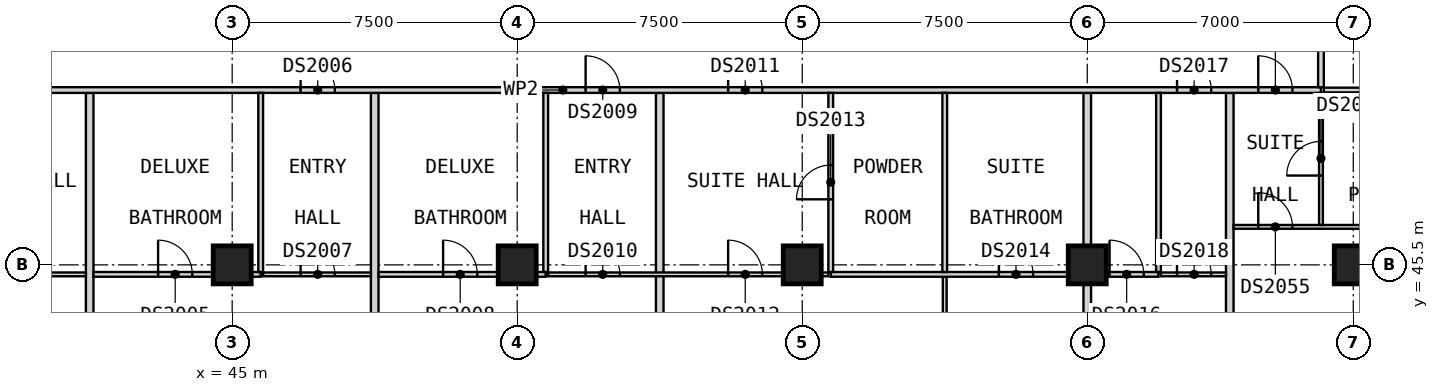
"""IFC4 building model, lengths in metres.
Left out: names, types, materials, properties, quantities, classifications, styles, units other than length and angle.
Written with IfcOpenShell. Run it as: python <this file> out.ifc"""

import sys

from ifc_helpers import new_model, si_unit, direction, frame, frame_2d, origin, origin_2d, place, context, subcontext, project, spatial, rectangle, extrude, element, fill, save


model = new_model("IFC4")
c1 = context("Model", 3, precision=1e-05, world=origin(), true_north=direction((0.0, 1.0)))
c2 = subcontext(c1, "Body", "Model", "MODEL_VIEW")
j1 = project(units=[si_unit("LENGTHUNIT", "METRE"), si_unit("PLANEANGLEUNIT", "RADIAN")], contexts=[c1])
p1 = place(None, origin())
s1 = spatial("IfcSite", under=j1, at=p1, CompositionType="ELEMENT")
p2 = place(p1, origin())
s2 = spatial("IfcBuilding", under=s1, at=p2, CompositionType="ELEMENT")
p3 = place(p2, frame((0.0, 0.0, 162.6)))
s3 = spatial("IfcBuildingStorey", under=s2, at=p3, CompositionType="ELEMENT", Elevation=162.6)
for number, where, z_axis, x_axis in (
    (1, (45.0, 45.5, 0.0), (0.0, 0.0, 1.0), (1.0, 0.0, 0.0)),
    (2, (52.5, 45.5, 0.0), (0.0, 0.0, 1.0), (1.0, 0.0, 0.0)),
    (3, (60.0, 45.5, 0.0), (0.0, 0.0, 1.0), (1.0, 0.0, 0.0)),
    (4, (67.5, 45.5, 0.0), (0.0, 0.0, 1.0), (1.0, 0.0, 0.0)),
    (5, (74.5, 45.5, 0.0), (0.0, 0.0, 1.0), (1.0, 0.0, 0.0)),
):
    element("IfcColumn", number, at=place(p3, frame(where, z_axis=z_axis, x_axis=x_axis)), inside=s3, PredefinedType="COLUMN", context=c2, shape_type="SweptSolid", body=[
        extrude(rectangle(XDim=1.0, YDim=1.0, at=origin_2d()), origin(), (0.0, 0.0, 1.0), 3.6),
    ])
for number, where, z_axis, x_axis in (
    (6, (41.25, 38.31, 0.0), (0.0, 0.0, 1.0), (0.0, 1.0, 0.0)),
    (7, (48.75, 38.31, 0.0), (0.0, 0.0, 1.0), (0.0, 1.0, 0.0)),
    (8, (56.25, 38.31, 0.0), (0.0, 0.0, 1.0), (0.0, 1.0, 0.0)),
):
    element("IfcWall", number, at=place(p3, frame(where, z_axis=z_axis, x_axis=x_axis)), inside=s3, PredefinedType="PARTITIONING", context=c2, shape_type="SweptSolid", body=[
        extrude(rectangle(XDim=11.715, YDim=0.2, at=frame_2d((5.857, 0.0))), origin(), (0.0, 0.0, 1.0), 3.2),
    ])
p4 = place(p3, frame((67.5, 37.5, 0.0), z_axis=(0.0, 0.0, 1.0), x_axis=(0.0, 1.0, 0.0)))
e9 = element("IfcWall", 9, at=p4, inside=s3, PredefinedType="PARTITIONING", context=c2, shape_type="SweptSolid", body=[
    extrude(rectangle(XDim=12.525, YDim=0.2, at=frame_2d((6.262, 0.0))), origin(), (0.0, 0.0, 1.0), 3.2),
])
p5 = place(p3, frame((71.25, 38.31, 0.0), z_axis=(0.0, 0.0, 1.0), x_axis=(0.0, 1.0, 0.0)))
e10 = element("IfcWall", 10, at=p5, inside=s3, PredefinedType="PARTITIONING", context=c2, shape_type="SweptSolid", body=[
    extrude(rectangle(XDim=11.715, YDim=0.2, at=frame_2d((5.857, 0.0))), origin(), (0.0, 0.0, 1.0), 3.2),
])
p6 = place(p3, frame((33.75, 50.1, 0.0), z_axis=(0.0, 0.0, 1.0), x_axis=(1.0, 0.0, 0.0)))
e11 = element("IfcWall", 11, at=p6, inside=s3, PredefinedType="PARTITIONING", context=c2, shape_type="SweptSolid", body=[
    extrude(rectangle(XDim=39.9, YDim=0.15, at=frame_2d((19.95, 0.0))), origin(), (0.0, 0.0, 1.0), 3.2),
])
p7 = place(p6, frame((5.175, 0.0, 0.0)))
e12 = element("IfcOpeningElement", 12, at=p7, cuts=e11, PredefinedType="OPENING", context=c2, shape_type="SweptSolid", body=[
    extrude(rectangle(XDim=0.9, YDim=2.1, at=frame_2d((0.45, 1.05))), frame((0.0, 0.085, 0.0), z_axis=(0.0, -1.0, 0.0), x_axis=(1.0, 0.0, 0.0)), (0.0, 0.0, 1.0), 0.17),
])
p8 = place(p6, frame((13.05, 0.0, 0.0)))
e13 = element("IfcOpeningElement", 13, at=p8, cuts=e11, PredefinedType="OPENING", context=c2, shape_type="SweptSolid", body=[
    extrude(rectangle(XDim=0.9, YDim=2.1, at=frame_2d((0.45, 1.05))), frame((0.0, 0.085, 0.0), z_axis=(0.0, -1.0, 0.0), x_axis=(1.0, 0.0, 0.0)), (0.0, 0.0, 1.0), 0.17),
])
p9 = place(p6, frame((20.55, 0.0, 0.0)))
e14 = element("IfcOpeningElement", 14, at=p9, cuts=e11, PredefinedType="OPENING", context=c2, shape_type="SweptSolid", body=[
    extrude(rectangle(XDim=0.9, YDim=2.1, at=frame_2d((0.45, 1.05))), frame((0.0, 0.085, 0.0), z_axis=(0.0, -1.0, 0.0), x_axis=(1.0, 0.0, 0.0)), (0.0, 0.0, 1.0), 0.17),
])
p10 = place(p6, frame((24.3, 0.0, 0.0)))
e15 = element("IfcOpeningElement", 15, at=p10, cuts=e11, PredefinedType="OPENING", context=c2, shape_type="SweptSolid", body=[
    extrude(rectangle(XDim=0.9, YDim=2.1, at=frame_2d((0.45, 1.05))), frame((0.0, 0.085, 0.0), z_axis=(0.0, -1.0, 0.0), x_axis=(1.0, 0.0, 0.0)), (0.0, 0.0, 1.0), 0.17),
])
p11 = place(p6, frame((36.113, 0.0, 0.0)))
e16 = element("IfcOpeningElement", 16, at=p11, cuts=e11, PredefinedType="OPENING", context=c2, shape_type="SweptSolid", body=[
    extrude(rectangle(XDim=0.9, YDim=2.1, at=frame_2d((0.45, 1.05))), frame((0.0, 0.085, 0.0), z_axis=(0.0, -1.0, 0.0), x_axis=(1.0, 0.0, 0.0)), (0.0, 0.0, 1.0), 0.17),
])
p12 = place(p6, frame((38.25, 0.0, 0.0)))
e17 = element("IfcOpeningElement", 17, at=p12, cuts=e11, PredefinedType="OPENING", context=c2, shape_type="SweptSolid", body=[
    extrude(rectangle(XDim=0.9, YDim=2.1, at=frame_2d((0.45, 1.05))), frame((0.0, 0.085, 0.0), z_axis=(0.0, -1.0, 0.0), x_axis=(1.0, 0.0, 0.0)), (0.0, 0.0, 1.0), 0.17),
])
p13 = place(p3, frame((73.65, 50.175, 0.0), z_axis=(0.0, 0.0, 1.0), x_axis=(0.0, 1.0, 0.0)))
e18 = element("IfcWall", 18, at=p13, inside=s3, PredefinedType="PARTITIONING", context=c2, shape_type="SweptSolid", body=[
    extrude(rectangle(XDim=38.4, YDim=0.15, at=frame_2d((19.2, 0.0))), origin(), (0.0, 0.0, 1.0), 3.2),
])
p14 = place(p13, frame((7.875, 0.0, 0.0)))
e19 = element("IfcOpeningElement", 19, at=p14, cuts=e18, PredefinedType="OPENING", context=c2, shape_type="SweptSolid", body=[
    extrude(rectangle(XDim=0.9, YDim=2.1, at=frame_2d((0.45, 1.05))), frame((0.0, 0.085, 0.0), z_axis=(0.0, -1.0, 0.0), x_axis=(1.0, 0.0, 0.0)), (0.0, 0.0, 1.0), 0.17),
])
p15 = place(p13, frame((12.188, 0.0, 0.0)))
e20 = element("IfcOpeningElement", 20, at=p15, cuts=e18, PredefinedType="OPENING", context=c2, shape_type="SweptSolid", body=[
    extrude(rectangle(XDim=0.9, YDim=2.1, at=frame_2d((0.45, 1.05))), frame((0.0, 0.085, 0.0), z_axis=(0.0, -1.0, 0.0), x_axis=(1.0, 0.0, 0.0)), (0.0, 0.0, 1.0), 0.17),
])
p16 = place(p13, frame((15.375, 0.0, 0.0)))
e21 = element("IfcOpeningElement", 21, at=p16, cuts=e18, PredefinedType="OPENING", context=c2, shape_type="SweptSolid", body=[
    extrude(rectangle(XDim=0.9, YDim=2.1, at=frame_2d((0.45, 1.05))), frame((0.0, 0.085, 0.0), z_axis=(0.0, -1.0, 0.0), x_axis=(1.0, 0.0, 0.0)), (0.0, 0.0, 1.0), 0.17),
])
p17 = place(p13, frame((30.375, 0.0, 0.0)))
e22 = element("IfcOpeningElement", 22, at=p17, cuts=e18, PredefinedType="OPENING", context=c2, shape_type="SweptSolid", body=[
    extrude(rectangle(XDim=0.9, YDim=2.1, at=frame_2d((0.45, 1.05))), frame((0.0, 0.085, 0.0), z_axis=(0.0, -1.0, 0.0), x_axis=(1.0, 0.0, 0.0)), (0.0, 0.0, 1.0), 0.17),
])
p18 = place(p13, frame((34.688, 0.0, 0.0)))
e23 = element("IfcOpeningElement", 23, at=p18, cuts=e18, PredefinedType="OPENING", context=c2, shape_type="SweptSolid", body=[
    extrude(rectangle(XDim=0.9, YDim=2.1, at=frame_2d((0.45, 1.05))), frame((0.0, 0.085, 0.0), z_axis=(0.0, -1.0, 0.0), x_axis=(1.0, 0.0, 0.0)), (0.0, 0.0, 1.0), 0.17),
])
p19 = place(p3, frame((33.812, 45.25, 0.0), z_axis=(0.0, 0.0, 1.0), x_axis=(1.0, 0.0, 0.0)))
e24 = element("IfcWall", 24, at=p19, inside=s3, PredefinedType="PARTITIONING", context=c2, shape_type="SweptSolid", body=[
    extrude(rectangle(XDim=7.337, YDim=0.1, at=frame_2d((3.669, 0.0))), origin(), (0.0, 0.0, 1.0), 3.2),
])
p20 = place(p19, frame((5.113, 0.0, 0.0)))
e25 = element("IfcOpeningElement", 25, at=p20, cuts=e24, PredefinedType="OPENING", context=c2, shape_type="SweptSolid", body=[
    extrude(rectangle(XDim=0.9, YDim=2.1, at=frame_2d((0.45, 1.05))), frame((0.0, 0.06, 0.0), z_axis=(0.0, -1.0, 0.0), x_axis=(1.0, 0.0, 0.0)), (0.0, 0.0, 1.0), 0.12),
])
p21 = place(p3, frame((45.812, 45.25, 0.0), z_axis=(0.0, 0.0, 1.0), x_axis=(1.0, 0.0, 0.0)))
e26 = element("IfcWall", 26, at=p21, inside=s3, PredefinedType="PARTITIONING", context=c2, shape_type="SweptSolid", body=[
    extrude(rectangle(XDim=2.837, YDim=0.1, at=frame_2d((1.419, 0.0))), origin(), (0.0, 0.0, 1.0), 3.2),
])
p22 = place(p21, frame((0.988, 0.0, 0.0)))
e27 = element("IfcOpeningElement", 27, at=p22, cuts=e26, PredefinedType="OPENING", context=c2, shape_type="SweptSolid", body=[
    extrude(rectangle(XDim=0.9, YDim=2.1, at=frame_2d((0.45, 1.05))), frame((0.0, 0.06, 0.0), z_axis=(0.0, -1.0, 0.0), x_axis=(1.0, 0.0, 0.0)), (0.0, 0.0, 1.0), 0.12),
])
p23 = place(p3, frame((53.312, 45.25, 0.0), z_axis=(0.0, 0.0, 1.0), x_axis=(1.0, 0.0, 0.0)))
e28 = element("IfcWall", 28, at=p23, inside=s3, PredefinedType="PARTITIONING", context=c2, shape_type="SweptSolid", body=[
    extrude(rectangle(XDim=7.375, YDim=0.1, at=frame_2d((3.688, 0.0))), origin(), (0.0, 0.0, 1.0), 3.2),
])
p24 = place(p23, frame((0.988, 0.0, 0.0)))
e29 = element("IfcOpeningElement", 29, at=p24, cuts=e28, PredefinedType="OPENING", context=c2, shape_type="SweptSolid", body=[
    extrude(rectangle(XDim=0.9, YDim=2.1, at=frame_2d((0.45, 1.05))), frame((0.0, 0.06, 0.0), z_axis=(0.0, -1.0, 0.0), x_axis=(1.0, 0.0, 0.0)), (0.0, 0.0, 1.0), 0.12),
])
p25 = place(p23, frame((4.738, 0.0, 0.0)))
e30 = element("IfcOpeningElement", 30, at=p25, cuts=e28, PredefinedType="OPENING", context=c2, shape_type="SweptSolid", body=[
    extrude(rectangle(XDim=0.9, YDim=2.1, at=frame_2d((0.45, 1.05))), frame((0.0, 0.06, 0.0), z_axis=(0.0, -1.0, 0.0), x_axis=(1.0, 0.0, 0.0)), (0.0, 0.0, 1.0), 0.12),
])
p26 = place(p3, frame((69.438, 45.25, 0.0), z_axis=(0.0, 0.0, 1.0), x_axis=(1.0, 0.0, 0.0)))
e31 = element("IfcWall", 31, at=p26, inside=s3, PredefinedType="PARTITIONING", context=c2, shape_type="SweptSolid", body=[
    extrude(rectangle(XDim=1.712, YDim=0.1, at=frame_2d((0.856, 0.0))), origin(), (0.0, 0.0, 1.0), 3.2),
])
p27 = place(p26, frame((0.425, 0.0, 0.0)))
e32 = element("IfcOpeningElement", 32, at=p27, cuts=e31, PredefinedType="OPENING", context=c2, shape_type="SweptSolid", body=[
    extrude(rectangle(XDim=0.9, YDim=2.1, at=frame_2d((0.45, 1.05))), frame((0.0, 0.06, 0.0), z_axis=(0.0, -1.0, 0.0), x_axis=(1.0, 0.0, 0.0)), (0.0, 0.0, 1.0), 0.12),
])
p28 = place(p3, frame((71.35, 46.5, 0.0), z_axis=(0.0, 0.0, 1.0), x_axis=(1.0, 0.0, 0.0)))
e33 = element("IfcWall", 33, at=p28, inside=s3, PredefinedType="PARTITIONING", context=c2, shape_type="SweptSolid", body=[
    extrude(rectangle(XDim=7.35, YDim=0.1, at=frame_2d((3.675, 0.0))), origin(), (0.0, 0.0, 1.0), 3.2),
])
p29 = place(p28, frame((0.65, 0.0, 0.0)))
e34 = element("IfcOpeningElement", 34, at=p29, cuts=e33, PredefinedType="OPENING", context=c2, shape_type="SweptSolid", body=[
    extrude(rectangle(XDim=0.9, YDim=2.1, at=frame_2d((0.45, 1.05))), frame((0.0, 0.06, 0.0), z_axis=(0.0, -1.0, 0.0), x_axis=(1.0, 0.0, 0.0)), (0.0, 0.0, 1.0), 0.12),
])
p30 = place(p3, frame((63.75, 38.31, 0.0), z_axis=(0.0, 0.0, 1.0), x_axis=(0.0, 1.0, 0.0)))
e35 = element("IfcWall", 35, at=p30, inside=s3, PredefinedType="PARTITIONING", context=c2, shape_type="SweptSolid", body=[
    extrude(rectangle(XDim=6.877, YDim=0.1, at=frame_2d((3.439, 0.0))), origin(), (0.0, 0.0, 1.0), 3.2),
])
p31 = place(p30, frame((2.615, 0.0, 0.0)))
e36 = element("IfcOpeningElement", 36, at=p31, cuts=e35, PredefinedType="OPENING", context=c2, shape_type="SweptSolid", body=[
    extrude(rectangle(XDim=0.9, YDim=2.1, at=frame_2d((0.45, 1.05))), frame((0.0, 0.06, 0.0), z_axis=(0.0, -1.0, 0.0), x_axis=(1.0, 0.0, 0.0)), (0.0, 0.0, 1.0), 0.12),
])
p32 = place(p3, frame((73.65, 46.55, 0.0), z_axis=(0.0, 0.0, 1.0), x_axis=(0.0, 1.0, 0.0)))
e37 = element("IfcWall", 37, at=p32, inside=s3, PredefinedType="PARTITIONING", context=c2, shape_type="SweptSolid", body=[
    extrude(rectangle(XDim=3.475, YDim=0.1, at=frame_2d((1.737, 0.0))), origin(), (0.0, 0.0, 1.0), 3.2),
])
p33 = place(p32, frame((1.3, 0.0, 0.0)))
e38 = element("IfcOpeningElement", 38, at=p33, cuts=e37, PredefinedType="OPENING", context=c2, shape_type="SweptSolid", body=[
    extrude(rectangle(XDim=0.9, YDim=2.1, at=frame_2d((0.45, 1.05))), frame((0.0, 0.06, 0.0), z_axis=(0.0, -1.0, 0.0), x_axis=(1.0, 0.0, 0.0)), (0.0, 0.0, 1.0), 0.12),
])
p34 = place(p3, frame((41.35, 45.25, 0.0), z_axis=(0.0, 0.0, 1.0), x_axis=(1.0, 0.0, 0.0)))
e39 = element("IfcWall", 39, at=p34, inside=s3, PredefinedType="PARTITIONING", context=c2, shape_type="SweptSolid", body=[
    extrude(rectangle(XDim=4.4, YDim=0.125, at=frame_2d((2.2, 0.0))), origin(), (0.0, 0.0, 1.0), 3.2),
])
p35 = place(p34, frame((1.7, 0.0, 0.0)))
e40 = element("IfcOpeningElement", 40, at=p35, cuts=e39, PredefinedType="OPENING", context=c2, shape_type="SweptSolid", body=[
    extrude(rectangle(XDim=0.9, YDim=2.1, at=frame_2d((0.45, 1.05))), frame((0.0, 0.073, 0.0), z_axis=(0.0, -1.0, 0.0), x_axis=(1.0, 0.0, 0.0)), (0.0, 0.0, 1.0), 0.145),
])
p36 = place(p3, frame((48.85, 45.25, 0.0), z_axis=(0.0, 0.0, 1.0), x_axis=(1.0, 0.0, 0.0)))
e41 = element("IfcWall", 41, at=p36, inside=s3, PredefinedType="PARTITIONING", context=c2, shape_type="SweptSolid", body=[
    extrude(rectangle(XDim=4.4, YDim=0.125, at=frame_2d((2.2, 0.0))), origin(), (0.0, 0.0, 1.0), 3.2),
])
p37 = place(p36, frame((1.7, 0.0, 0.0)))
e42 = element("IfcOpeningElement", 42, at=p37, cuts=e41, PredefinedType="OPENING", context=c2, shape_type="SweptSolid", body=[
    extrude(rectangle(XDim=0.9, YDim=2.1, at=frame_2d((0.45, 1.05))), frame((0.0, 0.073, 0.0), z_axis=(0.0, -1.0, 0.0), x_axis=(1.0, 0.0, 0.0)), (0.0, 0.0, 1.0), 0.145),
])
p38 = place(p3, frame((60.75, 45.25, 0.0), z_axis=(0.0, 0.0, 1.0), x_axis=(1.0, 0.0, 0.0)))
e43 = element("IfcWall", 43, at=p38, inside=s3, PredefinedType="PARTITIONING", context=c2, shape_type="SweptSolid", body=[
    extrude(rectangle(XDim=8.625, YDim=0.125, at=frame_2d((4.312, 0.0))), origin(), (0.0, 0.0, 1.0), 3.2),
])
p39 = place(p38, frame((4.425, 0.0, 0.0)))
e44 = element("IfcOpeningElement", 44, at=p39, cuts=e43, PredefinedType="OPENING", context=c2, shape_type="SweptSolid", body=[
    extrude(rectangle(XDim=0.9, YDim=2.1, at=frame_2d((0.45, 1.05))), frame((0.0, 0.073, 0.0), z_axis=(0.0, -1.0, 0.0), x_axis=(1.0, 0.0, 0.0)), (0.0, 0.0, 1.0), 0.145),
])
p40 = place(p38, frame((7.337, 0.0, 0.0)))
e45 = element("IfcOpeningElement", 45, at=p40, cuts=e43, PredefinedType="OPENING", context=c2, shape_type="SweptSolid", body=[
    extrude(rectangle(XDim=0.9, YDim=2.1, at=frame_2d((0.45, 1.05))), frame((0.0, 0.073, 0.0), z_axis=(0.0, -1.0, 0.0), x_axis=(1.0, 0.0, 0.0)), (0.0, 0.0, 1.0), 0.145),
])
p41 = place(p3, frame((73.725, 50.1, 0.0), z_axis=(0.0, 0.0, 1.0), x_axis=(1.0, 0.0, 0.0)))
e46 = element("IfcWall", 46, at=p41, inside=s3, PredefinedType="PARTITIONING", context=c2, shape_type="SweptSolid", body=[
    extrude(rectangle(XDim=5.025, YDim=0.125, at=frame_2d((2.512, 0.0))), origin(), (0.0, 0.0, 1.0), 3.2),
])
for number, where, z_axis, x_axis in (
    (47, (45.75, 45.312, 0.0), (0.0, 0.0, 1.0), (0.0, 1.0, 0.0)),
    (48, (53.25, 45.312, 0.0), (0.0, 0.0, 1.0), (0.0, 1.0, 0.0)),
):
    element("IfcWall", number, at=place(p3, frame(where, z_axis=z_axis, x_axis=x_axis)), inside=s3, PredefinedType="PARTITIONING", context=c2, shape_type="SweptSolid", body=[
        extrude(rectangle(XDim=4.712, YDim=0.125, at=frame_2d((2.356, 0.0))), origin(), (0.0, 0.0, 1.0), 3.2),
    ])
p42 = place(p3, frame((60.75, 45.312, 0.0), z_axis=(0.0, 0.0, 1.0), x_axis=(0.0, 1.0, 0.0)))
e49 = element("IfcWall", 49, at=p42, inside=s3, PredefinedType="PARTITIONING", context=c2, shape_type="SweptSolid", body=[
    extrude(rectangle(XDim=4.712, YDim=0.125, at=frame_2d((2.356, 0.0))), origin(), (0.0, 0.0, 1.0), 3.2),
])
p43 = place(p42, frame((1.913, 0.0, 0.0)))
e50 = element("IfcOpeningElement", 50, at=p43, cuts=e49, PredefinedType="OPENING", context=c2, shape_type="SweptSolid", body=[
    extrude(rectangle(XDim=0.9, YDim=2.1, at=frame_2d((0.45, 1.05))), frame((0.0, 0.073, 0.0), z_axis=(0.0, -1.0, 0.0), x_axis=(1.0, 0.0, 0.0)), (0.0, 0.0, 1.0), 0.145),
])
for number, where, z_axis, x_axis in (
    (51, (63.75, 45.312, 0.0), (0.0, 0.0, 1.0), (0.0, 1.0, 0.0)),
    (52, (69.375, 45.312, 0.0), (0.0, 0.0, 1.0), (0.0, 1.0, 0.0)),
):
    element("IfcWall", number, at=place(p3, frame(where, z_axis=z_axis, x_axis=x_axis)), inside=s3, PredefinedType="PARTITIONING", context=c2, shape_type="SweptSolid", body=[
        extrude(rectangle(XDim=4.712, YDim=0.125, at=frame_2d((2.356, 0.0))), origin(), (0.0, 0.0, 1.0), 3.2),
    ])
p44 = place(p35, origin())
e53 = element("IfcDoor", 53, at=p44, inside=s3, OperationType="SINGLE_SWING_LEFT", PredefinedType="DOOR", context=c2, shape_type="SweptSolid", body=[
    extrude(rectangle(XDim=0.9, YDim=2.1, at=frame_2d((0.45, 1.05))), frame((0.0, 0.025, 0.0), z_axis=(0.0, -1.0, 0.0), x_axis=(1.0, 0.0, 0.0)), (0.0, 0.0, 1.0), 0.05),
])
fill(e40, e53)
p45 = place(p8, origin())
e54 = element("IfcDoor", 54, at=p45, inside=s3, OperationType="SINGLE_SWING_RIGHT", PredefinedType="DOOR", context=c2, shape_type="SweptSolid", body=[
    extrude(rectangle(XDim=0.9, YDim=2.1, at=frame_2d((0.45, 1.05))), frame((0.0, 0.025, 0.0), z_axis=(0.0, -1.0, 0.0), x_axis=(1.0, 0.0, 0.0)), (0.0, 0.0, 1.0), 0.05),
])
fill(e13, e54)
p46 = place(p22, origin())
e55 = element("IfcDoor", 55, at=p46, inside=s3, OperationType="SINGLE_SWING_LEFT", PredefinedType="DOOR", context=c2, shape_type="SweptSolid", body=[
    extrude(rectangle(XDim=0.9, YDim=2.1, at=frame_2d((0.45, 1.05))), frame((0.0, 0.025, 0.0), z_axis=(0.0, -1.0, 0.0), x_axis=(1.0, 0.0, 0.0)), (0.0, 0.0, 1.0), 0.05),
])
fill(e27, e55)
p47 = place(p37, origin())
e56 = element("IfcDoor", 56, at=p47, inside=s3, OperationType="SINGLE_SWING_LEFT", PredefinedType="DOOR", context=c2, shape_type="SweptSolid", body=[
    extrude(rectangle(XDim=0.9, YDim=2.1, at=frame_2d((0.45, 1.05))), frame((0.0, 0.025, 0.0), z_axis=(0.0, -1.0, 0.0), x_axis=(1.0, 0.0, 0.0)), (0.0, 0.0, 1.0), 0.05),
])
fill(e42, e56)
p48 = place(p9, origin())
e57 = element("IfcDoor", 57, at=p48, inside=s3, OperationType="SINGLE_SWING_RIGHT", PredefinedType="DOOR", context=c2, shape_type="SweptSolid", body=[
    extrude(rectangle(XDim=0.9, YDim=2.1, at=frame_2d((0.45, 1.05))), frame((0.0, 0.025, 0.0), z_axis=(0.0, -1.0, 0.0), x_axis=(1.0, 0.0, 0.0)), (0.0, 0.0, 1.0), 0.05),
])
fill(e14, e57)
p49 = place(p24, origin())
e58 = element("IfcDoor", 58, at=p49, inside=s3, OperationType="SINGLE_SWING_LEFT", PredefinedType="DOOR", context=c2, shape_type="SweptSolid", body=[
    extrude(rectangle(XDim=0.9, YDim=2.1, at=frame_2d((0.45, 1.05))), frame((0.0, 0.025, 0.0), z_axis=(0.0, -1.0, 0.0), x_axis=(1.0, 0.0, 0.0)), (0.0, 0.0, 1.0), 0.05),
])
fill(e29, e58)
p50 = place(p10, origin())
e59 = element("IfcDoor", 59, at=p50, inside=s3, OperationType="SINGLE_SWING_RIGHT", PredefinedType="DOOR", context=c2, shape_type="SweptSolid", body=[
    extrude(rectangle(XDim=0.9, YDim=2.1, at=frame_2d((0.45, 1.05))), frame((0.0, 0.025, 0.0), z_axis=(0.0, -1.0, 0.0), x_axis=(1.0, 0.0, 0.0)), (0.0, 0.0, 1.0), 0.05),
])
fill(e15, e59)
p51 = place(p25, origin())
e60 = element("IfcDoor", 60, at=p51, inside=s3, OperationType="SINGLE_SWING_LEFT", PredefinedType="DOOR", context=c2, shape_type="SweptSolid", body=[
    extrude(rectangle(XDim=0.9, YDim=2.1, at=frame_2d((0.45, 1.05))), frame((0.0, 0.025, 0.0), z_axis=(0.0, -1.0, 0.0), x_axis=(1.0, 0.0, 0.0)), (0.0, 0.0, 1.0), 0.05),
])
fill(e30, e60)
p52 = place(p43, origin())
e61 = element("IfcDoor", 61, at=p52, inside=s3, OperationType="SINGLE_SWING_LEFT", PredefinedType="DOOR", context=c2, shape_type="SweptSolid", body=[
    extrude(rectangle(XDim=0.9, YDim=2.1, at=frame_2d((0.45, 1.05))), frame((0.0, 0.025, 0.0), z_axis=(0.0, -1.0, 0.0), x_axis=(1.0, 0.0, 0.0)), (0.0, 0.0, 1.0), 0.05),
])
fill(e50, e61)
p53 = place(p39, origin())
e62 = element("IfcDoor", 62, at=p53, inside=s3, OperationType="SINGLE_SWING_LEFT", PredefinedType="DOOR", context=c2, shape_type="SweptSolid", body=[
    extrude(rectangle(XDim=0.9, YDim=2.1, at=frame_2d((0.45, 1.05))), frame((0.0, 0.025, 0.0), z_axis=(0.0, -1.0, 0.0), x_axis=(1.0, 0.0, 0.0)), (0.0, 0.0, 1.0), 0.05),
])
fill(e44, e62)
p54 = place(p40, origin())
e63 = element("IfcDoor", 63, at=p54, inside=s3, OperationType="SINGLE_SWING_RIGHT", PredefinedType="DOOR", context=c2, shape_type="SweptSolid", body=[
    extrude(rectangle(XDim=0.9, YDim=2.1, at=frame_2d((0.45, 1.05))), frame((0.0, 0.025, 0.0), z_axis=(0.0, -1.0, 0.0), x_axis=(1.0, 0.0, 0.0)), (0.0, 0.0, 1.0), 0.05),
])
fill(e45, e63)
p55 = place(p11, origin())
e64 = element("IfcDoor", 64, at=p55, inside=s3, OperationType="SINGLE_SWING_RIGHT", PredefinedType="DOOR", context=c2, shape_type="SweptSolid", body=[
    extrude(rectangle(XDim=0.9, YDim=2.1, at=frame_2d((0.45, 1.05))), frame((0.0, 0.025, 0.0), z_axis=(0.0, -1.0, 0.0), x_axis=(1.0, 0.0, 0.0)), (0.0, 0.0, 1.0), 0.05),
])
fill(e16, e64)
p56 = place(p27, origin())
e65 = element("IfcDoor", 65, at=p56, inside=s3, OperationType="SINGLE_SWING_LEFT", PredefinedType="DOOR", context=c2, shape_type="SweptSolid", body=[
    extrude(rectangle(XDim=0.9, YDim=2.1, at=frame_2d((0.45, 1.05))), frame((0.0, 0.025, 0.0), z_axis=(0.0, -1.0, 0.0), x_axis=(1.0, 0.0, 0.0)), (0.0, 0.0, 1.0), 0.05),
])
fill(e32, e65)
p57 = place(p12, origin())
e66 = element("IfcDoor", 66, at=p57, inside=s3, OperationType="SINGLE_SWING_LEFT", PredefinedType="DOOR", context=c2, shape_type="SweptSolid", body=[
    extrude(rectangle(XDim=0.9, YDim=2.1, at=frame_2d((0.45, 1.05))), frame((0.0, 0.025, 0.0), z_axis=(0.0, -1.0, 0.0), x_axis=(1.0, 0.0, 0.0)), (0.0, 0.0, 1.0), 0.05),
])
fill(e17, e66)
p58 = place(p29, origin())
e67 = element("IfcDoor", 67, at=p58, inside=s3, OperationType="SINGLE_SWING_RIGHT", PredefinedType="DOOR", context=c2, shape_type="SweptSolid", body=[
    extrude(rectangle(XDim=0.9, YDim=2.1, at=frame_2d((0.45, 1.05))), frame((0.0, 0.025, 0.0), z_axis=(0.0, -1.0, 0.0), x_axis=(1.0, 0.0, 0.0)), (0.0, 0.0, 1.0), 0.05),
])
fill(e34, e67)
p59 = place(p33, origin())
e68 = element("IfcDoor", 68, at=p59, inside=s3, OperationType="SINGLE_SWING_RIGHT", PredefinedType="DOOR", context=c2, shape_type="SweptSolid", body=[
    extrude(rectangle(XDim=0.9, YDim=2.1, at=frame_2d((0.45, 1.05))), frame((0.0, 0.025, 0.0), z_axis=(0.0, -1.0, 0.0), x_axis=(1.0, 0.0, 0.0)), (0.0, 0.0, 1.0), 0.05),
])
fill(e38, e68)
save(model, sys.argv[1])
